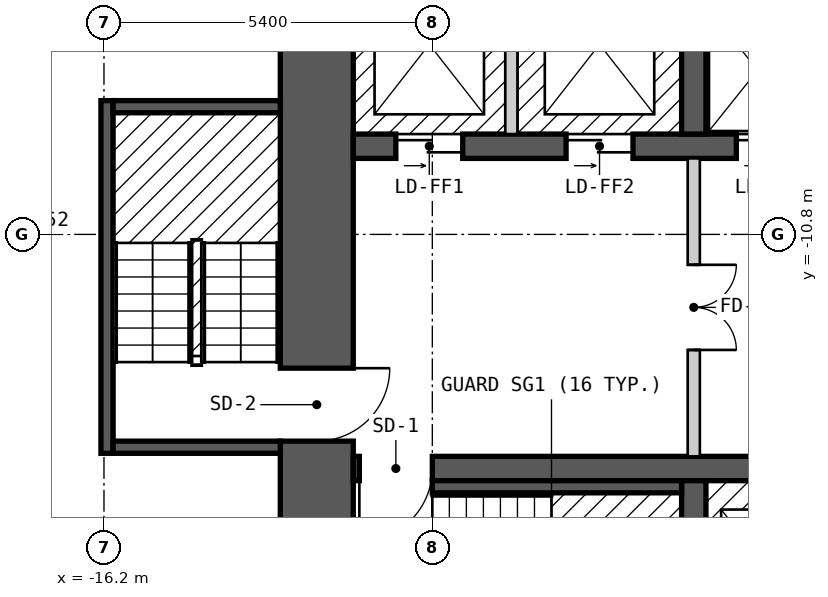
"""IFC4 building model, lengths in metres.
Left out: names, types, materials, properties, quantities, classifications, styles, units other than length and angle.
Written with IfcOpenShell. Run it as: python <this file> out.ifc"""

import sys

from ifc_helpers import new_model, si_unit, direction, frame, frame_2d, origin, place, context, subcontext, project, spatial, rectangle, extrude, element, fill, save


model = new_model("IFC4")
c1 = context("Model", 3, precision=1e-05, world=origin(), true_north=direction((0.0, 1.0)))
c2 = subcontext(c1, "Body", "Model", "MODEL_VIEW")
j1 = project(units=[si_unit("LENGTHUNIT", "METRE"), si_unit("PLANEANGLEUNIT", "RADIAN")], contexts=[c1])
p1 = place(None, origin())
s1 = spatial("IfcSite", under=j1, at=p1, CompositionType="ELEMENT")
p2 = place(p1, origin())
s2 = spatial("IfcBuilding", under=s1, at=p2, CompositionType="ELEMENT")
p3 = place(p2, frame((0.0, 0.0, 59.4)))
s3 = spatial("IfcBuildingStorey", under=s2, at=p3, CompositionType="ELEMENT", Elevation=59.4)
p4 = place(p3, frame((-12.7, -17.8, 0.0), z_axis=(0.0, 0.0, 1.0), x_axis=(0.0, 1.0, 0.0)))
e1 = element("IfcWall", 1, at=p4, inside=s3, PredefinedType="SHEAR", context=c2, shape_type="SweptSolid", body=[
    extrude(rectangle(XDim=11.6, YDim=1.2, at=frame_2d((5.8, 0.0))), origin(), (0.0, 0.0, 1.0), 2.6),
])
p5 = place(p4, frame((3.6, 0.0, 0.0)))
e2 = element("IfcOpeningElement", 2, at=p5, cuts=e1, PredefinedType="OPENING", context=c2, shape_type="SweptSolid", body=[
    extrude(rectangle(XDim=1.2, YDim=2.1, at=frame_2d((0.6, 1.05))), frame((0.0, 0.61, 0.0), z_axis=(0.0, -1.0, 0.0), x_axis=(1.0, 0.0, 0.0)), (0.0, 0.0, 1.0), 1.22),
])
p6 = place(p3, frame((-12.1, -14.65, 0.0), z_axis=(0.0, 0.0, 1.0), x_axis=(1.0, 0.0, 0.0)))
e3 = element("IfcWall", 3, at=p6, inside=s3, PredefinedType="SHEAR", context=c2, shape_type="SweptSolid", body=[
    extrude(rectangle(XDim=24.2, YDim=0.4, at=frame_2d((12.1, 0.0))), origin(), (0.0, 0.0, 1.0), 2.6),
])
p7 = place(p6, frame((1.3, 0.0, 0.0), z_axis=(0.0, 0.0, 1.0), x_axis=(-1.0, 0.0, 0.0)))
e4 = element("IfcOpeningElement", 4, at=p7, cuts=e3, PredefinedType="OPENING", context=c2, shape_type="SweptSolid", body=[
    extrude(rectangle(XDim=1.2, YDim=2.1, at=frame_2d((0.6, 1.05))), frame((0.0, 0.21, 0.0), z_axis=(0.0, -1.0, 0.0), x_axis=(1.0, 0.0, 0.0)), (0.0, 0.0, 1.0), 0.42),
])
p8 = place(p6, frame((24.15, 0.0, 0.0), z_axis=(0.0, 0.0, 1.0), x_axis=(-1.0, 0.0, 0.0)))
e5 = element("IfcOpeningElement", 5, at=p8, cuts=e3, PredefinedType="OPENING", context=c2, shape_type="SweptSolid", body=[
    extrude(rectangle(XDim=1.2, YDim=2.1, at=frame_2d((0.6, 1.05))), frame((0.0, 0.21, 0.0), z_axis=(0.0, -1.0, 0.0), x_axis=(1.0, 0.0, 0.0)), (0.0, 0.0, 1.0), 0.42),
])
p9 = place(p6, frame((16.6, 0.0, 0.0), z_axis=(0.0, 0.0, 1.0), x_axis=(-1.0, 0.0, 0.0)))
e6 = element("IfcOpeningElement", 6, at=p9, cuts=e3, PredefinedType="OPENING", context=c2, shape_type="SweptSolid", body=[
    extrude(rectangle(XDim=1.0, YDim=2.1, at=frame_2d((0.5, 1.05))), frame((0.0, 0.21, 0.0), z_axis=(0.0, -1.0, 0.0), x_axis=(1.0, 0.0, 0.0)), (0.0, 0.0, 1.0), 0.42),
])
p10 = place(p6, frame((18.35, 0.0, 0.0), z_axis=(0.0, 0.0, 1.0), x_axis=(-1.0, 0.0, 0.0)))
e7 = element("IfcOpeningElement", 7, at=p10, cuts=e3, PredefinedType="OPENING", context=c2, shape_type="SweptSolid", body=[
    extrude(rectangle(XDim=0.9, YDim=2.1, at=frame_2d((0.45, 1.05))), frame((0.0, 0.21, 0.0), z_axis=(0.0, -1.0, 0.0), x_axis=(1.0, 0.0, 0.0)), (0.0, 0.0, 1.0), 0.42),
])
p11 = place(p3, frame((-12.1, -9.35, 0.0), z_axis=(0.0, 0.0, 1.0), x_axis=(1.0, 0.0, 0.0)))
e8 = element("IfcWall", 8, at=p11, inside=s3, PredefinedType="SHEAR", context=c2, shape_type="SweptSolid", body=[
    extrude(rectangle(XDim=22.3, YDim=0.4, at=frame_2d((11.15, 0.0))), origin(), (0.0, 0.0, 1.0), 2.6),
])
p12 = place(p11, frame((0.7, 0.0, 0.0)))
e9 = element("IfcOpeningElement", 9, at=p12, cuts=e8, PredefinedType="OPENING", context=c2, shape_type="SweptSolid", body=[
    extrude(rectangle(XDim=1.1, YDim=2.1, at=frame_2d((0.55, 1.05))), frame((0.0, 0.21, 0.0), z_axis=(0.0, -1.0, 0.0), x_axis=(1.0, 0.0, 0.0)), (0.0, 0.0, 1.0), 0.42),
])
p13 = place(p11, frame((3.5, 0.0, 0.0)))
e10 = element("IfcOpeningElement", 10, at=p13, cuts=e8, PredefinedType="OPENING", context=c2, shape_type="SweptSolid", body=[
    extrude(rectangle(XDim=1.1, YDim=2.1, at=frame_2d((0.55, 1.05))), frame((0.0, 0.21, 0.0), z_axis=(0.0, -1.0, 0.0), x_axis=(1.0, 0.0, 0.0)), (0.0, 0.0, 1.0), 0.42),
])
p14 = place(p11, frame((6.3, 0.0, 0.0)))
e11 = element("IfcOpeningElement", 11, at=p14, cuts=e8, PredefinedType="OPENING", context=c2, shape_type="SweptSolid", body=[
    extrude(rectangle(XDim=1.1, YDim=2.1, at=frame_2d((0.55, 1.05))), frame((0.0, 0.21, 0.0), z_axis=(0.0, -1.0, 0.0), x_axis=(1.0, 0.0, 0.0)), (0.0, 0.0, 1.0), 0.42),
])
p15 = place(p11, frame((8.6, 0.0, 0.0)))
e12 = element("IfcOpeningElement", 12, at=p15, cuts=e8, PredefinedType="OPENING", context=c2, shape_type="SweptSolid", body=[
    extrude(rectangle(XDim=1.1, YDim=2.1, at=frame_2d((0.55, 1.05))), frame((0.0, 0.21, 0.0), z_axis=(0.0, -1.0, 0.0), x_axis=(1.0, 0.0, 0.0)), (0.0, 0.0, 1.0), 0.42),
])
p16 = place(p11, frame((10.9, 0.0, 0.0)))
e13 = element("IfcOpeningElement", 13, at=p16, cuts=e8, PredefinedType="OPENING", context=c2, shape_type="SweptSolid", body=[
    extrude(rectangle(XDim=1.1, YDim=2.1, at=frame_2d((0.55, 1.05))), frame((0.0, 0.21, 0.0), z_axis=(0.0, -1.0, 0.0), x_axis=(1.0, 0.0, 0.0)), (0.0, 0.0, 1.0), 0.42),
])
p17 = place(p11, frame((13.2, 0.0, 0.0)))
e14 = element("IfcOpeningElement", 14, at=p17, cuts=e8, PredefinedType="OPENING", context=c2, shape_type="SweptSolid", body=[
    extrude(rectangle(XDim=1.1, YDim=2.1, at=frame_2d((0.55, 1.05))), frame((0.0, 0.21, 0.0), z_axis=(0.0, -1.0, 0.0), x_axis=(1.0, 0.0, 0.0)), (0.0, 0.0, 1.0), 0.42),
])
p18 = place(p11, frame((15.5, 0.0, 0.0)))
e15 = element("IfcOpeningElement", 15, at=p18, cuts=e8, PredefinedType="OPENING", context=c2, shape_type="SweptSolid", body=[
    extrude(rectangle(XDim=1.1, YDim=2.1, at=frame_2d((0.55, 1.05))), frame((0.0, 0.21, 0.0), z_axis=(0.0, -1.0, 0.0), x_axis=(1.0, 0.0, 0.0)), (0.0, 0.0, 1.0), 0.42),
])
p19 = place(p11, frame((17.8, 0.0, 0.0)))
e16 = element("IfcOpeningElement", 16, at=p19, cuts=e8, PredefinedType="OPENING", context=c2, shape_type="SweptSolid", body=[
    extrude(rectangle(XDim=1.1, YDim=2.1, at=frame_2d((0.55, 1.05))), frame((0.0, 0.21, 0.0), z_axis=(0.0, -1.0, 0.0), x_axis=(1.0, 0.0, 0.0)), (0.0, 0.0, 1.0), 0.42),
])
p20 = place(p11, frame((20.2, 0.0, 0.0)))
e17 = element("IfcOpeningElement", 17, at=p20, cuts=e8, PredefinedType="OPENING", context=c2, shape_type="SweptSolid", body=[
    extrude(rectangle(XDim=1.1, YDim=2.1, at=frame_2d((0.55, 1.05))), frame((0.0, 0.21, 0.0), z_axis=(0.0, -1.0, 0.0), x_axis=(1.0, 0.0, 0.0)), (0.0, 0.0, 1.0), 0.42),
])
for number, where, z_axis, x_axis in (
    (18, (-6.5, -17.8, 0.0), (0.0, 0.0, 1.0), (0.0, 1.0, 0.0)),
    (19, (-6.5, -9.15, 0.0), (0.0, 0.0, 1.0), (0.0, 1.0, 0.0)),
):
    element("IfcWall", number, at=place(p3, frame(where, z_axis=z_axis, x_axis=x_axis)), inside=s3, PredefinedType="SHEAR", context=c2, shape_type="SweptSolid", body=[
        extrude(rectangle(XDim=2.95, YDim=0.4, at=frame_2d((1.475, 0.0))), origin(), (0.0, 0.0, 1.0), 2.6),
    ])
p21 = place(p3, frame((-16.15, -14.4, 0.0), z_axis=(0.0, 0.0, 1.0), x_axis=(0.0, 1.0, 0.0)))
e20 = element("IfcWall", 20, at=p21, inside=s3, PredefinedType="SOLIDWALL", context=c2, shape_type="SweptSolid", body=[
    extrude(rectangle(XDim=5.8, YDim=0.2, at=frame_2d((2.9, 0.0))), origin(), (0.0, 0.0, 1.0), 2.6),
])
for number, where, z_axis, x_axis in (
    (21, (-16.05, -14.3, 0.0), (0.0, 0.0, 1.0), (1.0, 0.0, 0.0)),
    (22, (-16.05, -8.7, 0.0), (0.0, 0.0, 1.0), (1.0, 0.0, 0.0)),
):
    element("IfcWall", number, at=place(p3, frame(where, z_axis=z_axis, x_axis=x_axis)), inside=s3, PredefinedType="SOLIDWALL", context=c2, shape_type="SweptSolid", body=[
        extrude(rectangle(XDim=2.75, YDim=0.2, at=frame_2d((1.375, 0.0))), origin(), (0.0, 0.0, 1.0), 2.6),
    ])
p22 = place(p3, frame((-10.8, -14.95, 0.0), z_axis=(0.0, 0.0, 1.0), x_axis=(1.0, 0.0, 0.0)))
e23 = element("IfcWall", 23, at=p22, inside=s3, PredefinedType="SOLIDWALL", context=c2, shape_type="SweptSolid", body=[
    extrude(rectangle(XDim=4.1, YDim=0.2, at=frame_2d((2.05, 0.0))), origin(), (0.0, 0.0, 1.0), 2.6),
])
p23 = place(p3, frame((-9.5, -9.15, 0.0), z_axis=(0.0, 0.0, 1.0), x_axis=(0.0, 1.0, 0.0)))
e24 = element("IfcWall", 24, at=p23, inside=s3, PredefinedType="SOLIDWALL", context=c2, shape_type="SweptSolid", body=[
    extrude(rectangle(XDim=2.95, YDim=0.2, at=frame_2d((1.475, 0.0))), origin(), (0.0, 0.0, 1.0), 2.6),
])
p24 = place(p3, frame((-6.5, -14.45, 0.0), z_axis=(0.0, 0.0, 1.0), x_axis=(0.0, 1.0, 0.0)))
e25 = element("IfcWall", 25, at=p24, inside=s3, PredefinedType="PARTITIONING", context=c2, shape_type="SweptSolid", body=[
    extrude(rectangle(XDim=4.9, YDim=0.2, at=frame_2d((2.45, 0.0))), origin(), (0.0, 0.0, 1.0), 2.6),
])
p25 = place(p24, frame((3.15, 0.0, 0.0), z_axis=(0.0, 0.0, 1.0), x_axis=(-1.0, 0.0, 0.0)))
e26 = element("IfcOpeningElement", 26, at=p25, cuts=e25, PredefinedType="OPENING", context=c2, shape_type="SweptSolid", body=[
    extrude(rectangle(XDim=1.4, YDim=2.1, at=frame_2d((0.7, 1.05))), frame((0.0, 0.11, 0.0), z_axis=(0.0, -1.0, 0.0), x_axis=(1.0, 0.0, 0.0)), (0.0, 0.0, 1.0), 0.22),
])
p26 = place(p12, origin())
e27 = element("IfcDoor", 27, at=p26, inside=s3, OperationType="DOUBLE_DOOR_SLIDING", PredefinedType="DOOR", context=c2, shape_type="SweptSolid", body=[
    extrude(rectangle(XDim=1.1, YDim=2.1, at=frame_2d((0.55, 1.05))), frame((0.0, 0.025, 0.0), z_axis=(0.0, -1.0, 0.0), x_axis=(1.0, 0.0, 0.0)), (0.0, 0.0, 1.0), 0.05),
])
fill(e9, e27)
p27 = place(p13, origin())
e28 = element("IfcDoor", 28, at=p27, inside=s3, OperationType="DOUBLE_DOOR_SLIDING", PredefinedType="DOOR", context=c2, shape_type="SweptSolid", body=[
    extrude(rectangle(XDim=1.1, YDim=2.1, at=frame_2d((0.55, 1.05))), frame((0.0, 0.025, 0.0), z_axis=(0.0, -1.0, 0.0), x_axis=(1.0, 0.0, 0.0)), (0.0, 0.0, 1.0), 0.05),
])
fill(e10, e28)
p28 = place(p14, origin())
e29 = element("IfcDoor", 29, at=p28, inside=s3, OperationType="DOUBLE_DOOR_SLIDING", PredefinedType="DOOR", context=c2, shape_type="SweptSolid", body=[
    extrude(rectangle(XDim=1.1, YDim=2.1, at=frame_2d((0.55, 1.05))), frame((0.0, 0.025, 0.0), z_axis=(0.0, -1.0, 0.0), x_axis=(1.0, 0.0, 0.0)), (0.0, 0.0, 1.0), 0.05),
])
fill(e11, e29)
p29 = place(p7, origin())
e30 = element("IfcDoor", 30, at=p29, inside=s3, OperationType="SINGLE_SWING_RIGHT", PredefinedType="DOOR", context=c2, shape_type="SweptSolid", body=[
    extrude(rectangle(XDim=1.2, YDim=2.1, at=frame_2d((0.6, 1.05))), frame((0.0, 0.025, 0.0), z_axis=(0.0, -1.0, 0.0), x_axis=(1.0, 0.0, 0.0)), (0.0, 0.0, 1.0), 0.05),
])
fill(e4, e30)
p30 = place(p5, origin())
e31 = element("IfcDoor", 31, at=p30, inside=s3, OperationType="SINGLE_SWING_RIGHT", PredefinedType="DOOR", context=c2, shape_type="SweptSolid", body=[
    extrude(rectangle(XDim=1.2, YDim=2.1, at=frame_2d((0.6, 1.05))), frame((0.0, 0.025, 0.0), z_axis=(0.0, -1.0, 0.0), x_axis=(1.0, 0.0, 0.0)), (0.0, 0.0, 1.0), 0.05),
])
fill(e2, e31)
p31 = place(p25, origin())
e32 = element("IfcDoor", 32, at=p31, inside=s3, OperationType="DOUBLE_DOOR_SINGLE_SWING", PredefinedType="DOOR", context=c2, shape_type="SweptSolid", body=[
    extrude(rectangle(XDim=1.4, YDim=2.1, at=frame_2d((0.7, 1.05))), frame((0.0, 0.025, 0.0), z_axis=(0.0, -1.0, 0.0), x_axis=(1.0, 0.0, 0.0)), (0.0, 0.0, 1.0), 0.05),
])
fill(e26, e32)
save(model, sys.argv[1])
